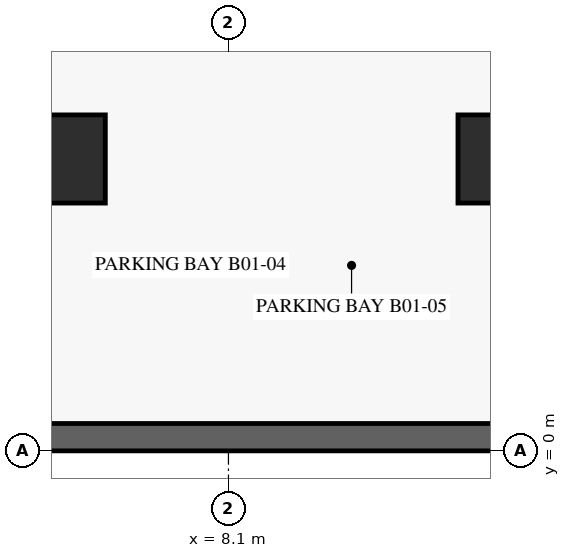
"""IFC4 building model, lengths in metres.
Left out: names, types, materials, properties, quantities, classifications, styles, units other than length and angle.
Written with IfcOpenShell. Run it as: python <this file> out.ifc"""

import sys

from ifc_helpers import new_model, si_unit, direction, frame, frame_2d, origin, origin_2d, place, context, subcontext, project, spatial, rectangle, extrude, source, transform, mapped, element, save


model = new_model("IFC4")
c1 = context("Model", 3, precision=1e-05, world=origin(), true_north=direction((0.0, 1.0)))
c2 = subcontext(c1, "Body", "Model", "MODEL_VIEW")
j1 = project(units=[si_unit("LENGTHUNIT", "METRE"), si_unit("PLANEANGLEUNIT", "RADIAN")], contexts=[c1])
p1 = place(None, origin())
s1 = spatial("IfcSite", under=j1, at=p1, CompositionType="ELEMENT")
p2 = place(p1, origin())
s2 = spatial("IfcBuilding", under=s1, at=p2, CompositionType="ELEMENT")
p3 = place(p2, frame((0.0, 0.0, -3.6)))
s3 = spatial("IfcBuildingStorey", under=s2, at=p3, CompositionType="ELEMENT", Elevation=-3.6)
p4 = place(p3, frame((0.225, 0.225, -0.36), z_axis=(0.0, 0.0, 1.0), x_axis=(1.0, 0.0, 0.0)))
e1 = element("IfcWall", 1, at=p4, inside=s3, PredefinedType="USERDEFINED", context=c2, shape_type="SweptSolid", body=[
    extrude(rectangle(XDim=64.35, YDim=0.45, at=frame_2d((32.175, 0.0))), origin(), (0.0, 0.0, 1.0), 3.578),
])
m1 = source(origin(), c2, "Body", "SweptSolid", [
    extrude(rectangle(XDim=1.45, YDim=1.45, at=origin_2d()), origin(), (0.0, 0.0, 1.0), 3.58),
])
for number, where, z_axis, x_axis in (
    (2, (12.6, 4.8, -0.36), (0.0, 0.0, 1.0), (1.0, 0.0, 0.0)),
    (3, (5.35, 4.8, -0.36), (0.0, 0.0, 1.0), (1.0, 0.0, 0.0)),
):
    element("IfcColumn", number, at=place(p3, frame(where, z_axis=z_axis, x_axis=x_axis)), inside=s3, PredefinedType="COLUMN", context=c2, shape_type="MappedRepresentation", body=[
        mapped(m1, transform((0.0, 0.0, 0.0), scale=1.0)),
    ])
save(model, sys.argv[1])
